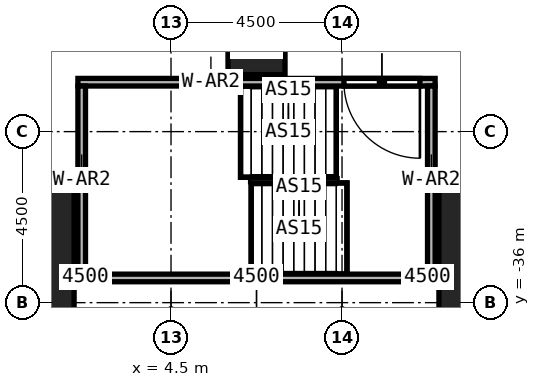
"""IFC4 building model, lengths in metres.
Left out: names, types, materials, properties, quantities, classifications, styles, units other than length and angle.
Written with IfcOpenShell. Run it as: python <this file> out.ifc"""

import sys

from ifc_helpers import new_model, si_unit, direction, frame, frame_2d, origin, origin_2d, place, context, subcontext, project, spatial, rectangle, extrude, element, fill, save


model = new_model("IFC4")
c1 = context("Model", 3, precision=1e-05, world=origin(), true_north=direction((0.0, 1.0)))
c2 = subcontext(c1, "Body", "Model", "MODEL_VIEW")
j1 = project(units=[si_unit("LENGTHUNIT", "METRE"), si_unit("PLANEANGLEUNIT", "RADIAN")], contexts=[c1])
p1 = place(None, origin())
s1 = spatial("IfcSite", under=j1, at=p1, CompositionType="ELEMENT")
p2 = place(p1, origin())
s2 = spatial("IfcBuilding", under=s1, at=p2, CompositionType="ELEMENT")
p3 = place(p2, frame((0.0, 0.0, 19.0)))
s3 = spatial("IfcBuildingStorey", under=s2, at=p3, CompositionType="ELEMENT", Elevation=19.0)
for number, where, z_axis, x_axis in (
    (1, (0.0, -35.85, 0.0), (0.0, 0.0, 1.0), (1.0, 0.0, 0.0)),
    (2, (13.5, -35.85, 0.0), (0.0, 0.0, 1.0), (1.0, 0.0, 0.0)),
):
    element("IfcColumn", number, at=place(p3, frame(where, z_axis=z_axis, x_axis=x_axis)), inside=s3, PredefinedType="COLUMN", context=c2, shape_type="SweptSolid", body=[
        extrude(rectangle(XDim=3.9, YDim=6.3, at=origin_2d()), origin(), (0.0, 0.0, 1.0), 6.0),
    ])
p4 = place(p3, frame((6.75, -29.25, 0.0), z_axis=(0.0, 0.0, 1.0), x_axis=(1.0, 0.0, 0.0)))
e3 = element("IfcColumn", 3, at=p4, inside=s3, PredefinedType="COLUMN", context=c2, shape_type="SweptSolid", body=[
    extrude(rectangle(XDim=1.5, YDim=1.5, at=origin_2d()), origin(), (0.0, 0.0, 1.0), 6.0),
])
p5 = place(p3, frame((11.45, -30.2, 0.0), z_axis=(0.0, 0.0, 1.0), x_axis=(-1.0, 0.0, 0.0)))
e4 = element("IfcWall", 4, at=p5, inside=s3, PredefinedType="SOLIDWALL", context=c2, shape_type="SweptSolid", body=[
    extrude(rectangle(XDim=9.4, YDim=0.2, at=frame_2d((4.7, 0.0))), origin(), (0.0, 0.0, 1.0), 6.0),
])
p6 = place(p5, frame((0.4, 0.0, 0.0)))
e5 = element("IfcOpeningElement", 5, at=p6, cuts=e4, PredefinedType="OPENING", context=c2, shape_type="SweptSolid", body=[
    extrude(rectangle(XDim=2.0, YDim=2.4, at=frame_2d((1.0, 1.2))), frame((0.0, 0.1, 0.0), z_axis=(0.0, -1.0, 0.0), x_axis=(1.0, 0.0, 0.0)), (0.0, 0.0, 1.0), 0.2),
])
p7 = place(p3, frame((2.05, -35.35, 0.0), z_axis=(0.0, 0.0, 1.0), x_axis=(1.0, 0.0, 0.0)))
e6 = element("IfcWall", 6, at=p7, inside=s3, PredefinedType="SOLIDWALL", context=c2, shape_type="SweptSolid", body=[
    extrude(rectangle(XDim=9.4, YDim=0.2, at=frame_2d((4.7, 0.0))), origin(), (0.0, 0.0, 1.0), 6.0),
])
for number, where, z_axis, x_axis in (
    (7, (2.15, -35.25, 0.0), (0.0, 0.0, 1.0), (0.0, 1.0, 0.0)),
    (8, (11.35, -35.25, 0.0), (0.0, 0.0, 1.0), (0.0, 1.0, 0.0)),
):
    element("IfcWall", number, at=place(p3, frame(where, z_axis=z_axis, x_axis=x_axis)), inside=s3, PredefinedType="SOLIDWALL", context=c2, shape_type="SweptSolid", body=[
        extrude(rectangle(XDim=4.95, YDim=0.2, at=frame_2d((2.475, 0.0))), origin(), (0.0, 0.0, 1.0), 6.0),
    ])
p8 = place(p6, origin())
e9 = element("IfcDoor", 9, at=p8, inside=s3, OperationType="DOUBLE_DOOR_SINGLE_SWING", PredefinedType="DOOR", context=c2, shape_type="SweptSolid", body=[
    extrude(rectangle(XDim=2.0, YDim=2.4, at=frame_2d((1.0, 1.2))), frame((0.0, 0.025, 0.0), z_axis=(0.0, -1.0, 0.0), x_axis=(1.0, 0.0, 0.0)), (0.0, 0.0, 1.0), 0.05),
])
fill(e5, e9)
save(model, sys.argv[1])
